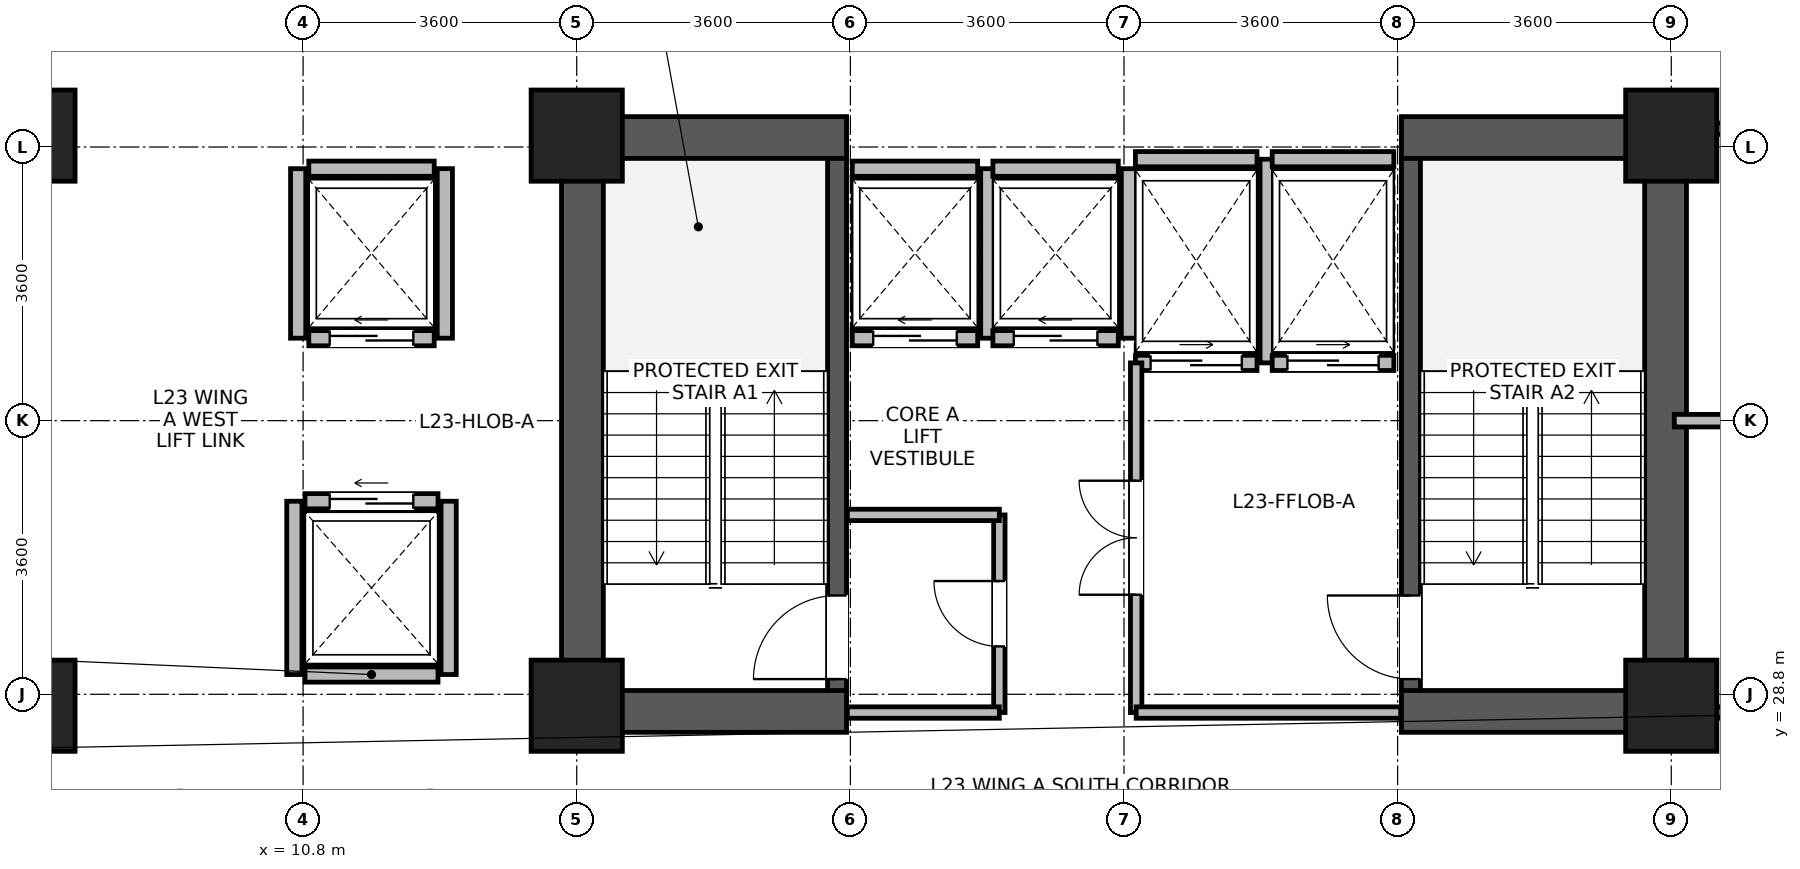
"""IFC4 building model, lengths in metres.
Left out: names, types, materials, properties, quantities, classifications, styles, units other than length and angle.
Written with IfcOpenShell. Run it as: python <this file> out.ifc"""

import sys

from ifc_helpers import new_model, si_unit, direction, frame, frame_2d, origin, origin_2d, place, context, subcontext, project, spatial, rectangle, extrude, source, transform, mapped, element, fill, save


model = new_model("IFC4")
c1 = context("Model", 3, precision=1e-05, world=origin(), true_north=direction((0.0, 1.0)))
c2 = subcontext(c1, "Body", "Model", "MODEL_VIEW")
j1 = project(units=[si_unit("LENGTHUNIT", "METRE"), si_unit("PLANEANGLEUNIT", "RADIAN")], contexts=[c1])
p1 = place(None, origin())
s1 = spatial("IfcSite", under=j1, at=p1, CompositionType="ELEMENT")
p2 = place(p1, origin())
s2 = spatial("IfcBuilding", under=s1, at=p2, CompositionType="ELEMENT")
p3 = place(p2, frame((0.0, 0.0, 93.4)))
s3 = spatial("IfcBuildingStorey", under=s2, at=p3, CompositionType="ELEMENT", Elevation=93.4)
for number, where, z_axis, x_axis in (
    (1, (14.475, 28.3, 0.0), (0.0, 0.0, 1.0), (0.0, 1.0, 0.0)),
    (2, (28.725, 28.3, 0.0), (0.0, 0.0, 1.0), (0.0, 1.0, 0.0)),
):
    element("IfcWall", number, at=place(p3, frame(where, z_axis=z_axis, x_axis=x_axis)), inside=s3, PredefinedType="SHEAR", context=c2, shape_type="SweptSolid", body=[
        extrude(rectangle(XDim=8.1, YDim=0.55, at=frame_2d((4.05, 0.0))), origin(), (0.0, 0.0, 1.0), 3.45),
    ])
for number, where, z_axis, x_axis in (
    (3, (14.75, 28.575, 0.0), (0.0, 0.0, 1.0), (1.0, 0.0, 0.0)),
    (4, (25.25, 28.575, 0.0), (0.0, 0.0, 1.0), (1.0, 0.0, 0.0)),
    (5, (14.75, 36.125, 0.0), (0.0, 0.0, 1.0), (1.0, 0.0, 0.0)),
    (6, (25.25, 36.125, 0.0), (0.0, 0.0, 1.0), (1.0, 0.0, 0.0)),
):
    element("IfcWall", number, at=place(p3, frame(where, z_axis=z_axis, x_axis=x_axis)), inside=s3, PredefinedType="SHEAR", context=c2, shape_type="SweptSolid", body=[
        extrude(rectangle(XDim=3.2, YDim=0.55, at=frame_2d((1.6, 0.0))), origin(), (0.0, 0.0, 1.0), 3.45),
    ])
p4 = place(p3, frame((17.825, 28.85, 0.0), z_axis=(0.0, 0.0, 1.0), x_axis=(0.0, 1.0, 0.0)))
e7 = element("IfcWall", 7, at=p4, inside=s3, PredefinedType="SHEAR", context=c2, shape_type="SweptSolid", body=[
    extrude(rectangle(XDim=7.0, YDim=0.25, at=frame_2d((3.5, 0.0))), origin(), (0.0, 0.0, 1.0), 3.45),
])
p5 = place(p4, frame((0.15, 0.0, 0.0)))
e8 = element("IfcOpeningElement", 8, at=p5, cuts=e7, PredefinedType="OPENING", context=c2, shape_type="SweptSolid", body=[
    extrude(rectangle(XDim=1.1, YDim=2.08, at=frame_2d((0.55, 1.04))), frame((0.0, 0.135, 0.0), z_axis=(0.0, -1.0, 0.0), x_axis=(1.0, 0.0, 0.0)), (0.0, 0.0, 1.0), 0.27),
])
p6 = place(p3, frame((25.375, 28.85, 0.0), z_axis=(0.0, 0.0, 1.0), x_axis=(0.0, 1.0, 0.0)))
e9 = element("IfcWall", 9, at=p6, inside=s3, PredefinedType="SHEAR", context=c2, shape_type="SweptSolid", body=[
    extrude(rectangle(XDim=7.0, YDim=0.25, at=frame_2d((3.5, 0.0))), origin(), (0.0, 0.0, 1.0), 3.45),
])
p7 = place(p6, frame((0.15, 0.0, 0.0)))
e10 = element("IfcOpeningElement", 10, at=p7, cuts=e9, PredefinedType="OPENING", context=c2, shape_type="SweptSolid", body=[
    extrude(rectangle(XDim=1.1, YDim=2.08, at=frame_2d((0.55, 1.04))), frame((0.0, 0.135, 0.0), z_axis=(0.0, -1.0, 0.0), x_axis=(1.0, 0.0, 0.0)), (0.0, 0.0, 1.0), 0.27),
])
m1 = source(origin(), c2, "Body", "SweptSolid", [
    extrude(rectangle(XDim=1.2, YDim=1.2, at=origin_2d()), origin(), (0.0, 0.0, 1.0), 3.7),
])
for number, where, z_axis, x_axis in (
    (11, (7.2, 28.65, 0.0), (0.0, 0.0, 1.0), (1.0, 0.0, 0.0)),
    (12, (7.2, 36.15, 0.0), (0.0, 0.0, 1.0), (1.0, 0.0, 0.0)),
    (13, (14.4, 28.65, 0.0), (0.0, 0.0, 1.0), (1.0, 0.0, 0.0)),
    (14, (14.4, 36.15, 0.0), (0.0, 0.0, 1.0), (1.0, 0.0, 0.0)),
    (15, (28.8, 28.65, 0.0), (0.0, 0.0, 1.0), (1.0, 0.0, 0.0)),
    (16, (28.8, 36.15, 0.0), (0.0, 0.0, 1.0), (1.0, 0.0, 0.0)),
):
    element("IfcColumn", number, at=place(p3, frame(where, z_axis=z_axis, x_axis=x_axis)), inside=s3, PredefinedType="COLUMN", context=c2, shape_type="MappedRepresentation", body=[
        mapped(m1, transform((0.0, 0.0, 0.0), x_axis=(1.0, 0.0, 0.0), y_axis=(0.0, 1.0, 0.0), z_axis=(0.0, 0.0, 1.0), scale=1.0)),
    ])
p8 = place(p3, frame((18.025, 33.485, 0.0), z_axis=(0.0, 0.0, 1.0), x_axis=(1.0, 0.0, 0.0)))
e17 = element("IfcWall", 17, at=p8, inside=s3, PredefinedType="PARTITIONING", context=c2, shape_type="SweptSolid", body=[
    extrude(rectangle(XDim=1.65, YDim=0.2, at=frame_2d((0.825, 0.0))), origin(), (0.0, 0.0, 1.0), 3.43),
])
p9 = place(p8, frame((0.275, 0.0, 0.0)))
e18 = element("IfcOpeningElement", 18, at=p9, cuts=e17, PredefinedType="OPENING", context=c2, shape_type="SweptSolid", body=[
    extrude(rectangle(XDim=1.1, YDim=2.12, at=frame_2d((0.55, 1.06))), frame((0.0, 0.11, 0.0), z_axis=(0.0, -1.0, 0.0), x_axis=(1.0, 0.0, 0.0)), (0.0, 0.0, 1.0), 0.22),
])
p10 = place(p3, frame((18.025, 35.715, 0.0), z_axis=(0.0, 0.0, 1.0), x_axis=(1.0, 0.0, 0.0)))
e19 = element("IfcWall", 19, at=p10, inside=s3, PredefinedType="PARTITIONING", context=c2, shape_type="SweptSolid", body=[
    extrude(rectangle(XDim=1.65, YDim=0.2, at=frame_2d((0.825, 0.0))), origin(), (0.0, 0.0, 1.0), 2.23),
])
p11 = place(p3, frame((19.815, 33.485, 0.0), z_axis=(0.0, 0.0, 1.0), x_axis=(0.0, 1.0, 0.0)))
e20 = element("IfcWall", 20, at=p11, inside=s3, PredefinedType="PARTITIONING", context=c2, shape_type="SweptSolid", body=[
    extrude(rectangle(XDim=2.23, YDim=0.2, at=frame_2d((1.115, 0.0))), origin(), (0.0, 0.0, 1.0), 3.43),
])
p12 = place(p3, frame((19.875, 33.485, 0.0), z_axis=(0.0, 0.0, 1.0), x_axis=(1.0, 0.0, 0.0)))
e21 = element("IfcWall", 21, at=p12, inside=s3, PredefinedType="PARTITIONING", context=c2, shape_type="SweptSolid", body=[
    extrude(rectangle(XDim=1.65, YDim=0.2, at=frame_2d((0.825, 0.0))), origin(), (0.0, 0.0, 1.0), 3.43),
])
p13 = place(p12, frame((0.275, 0.0, 0.0)))
e22 = element("IfcOpeningElement", 22, at=p13, cuts=e21, PredefinedType="OPENING", context=c2, shape_type="SweptSolid", body=[
    extrude(rectangle(XDim=1.1, YDim=2.12, at=frame_2d((0.55, 1.06))), frame((0.0, 0.11, 0.0), z_axis=(0.0, -1.0, 0.0), x_axis=(1.0, 0.0, 0.0)), (0.0, 0.0, 1.0), 0.22),
])
p14 = place(p3, frame((19.875, 35.715, 0.0), z_axis=(0.0, 0.0, 1.0), x_axis=(1.0, 0.0, 0.0)))
e23 = element("IfcWall", 23, at=p14, inside=s3, PredefinedType="PARTITIONING", context=c2, shape_type="SweptSolid", body=[
    extrude(rectangle(XDim=1.65, YDim=0.2, at=frame_2d((0.825, 0.0))), origin(), (0.0, 0.0, 1.0), 2.23),
])
p15 = place(p3, frame((21.665, 33.485, 0.0), z_axis=(0.0, 0.0, 1.0), x_axis=(0.0, 1.0, 0.0)))
e24 = element("IfcWall", 24, at=p15, inside=s3, PredefinedType="PARTITIONING", context=c2, shape_type="SweptSolid", body=[
    extrude(rectangle(XDim=2.23, YDim=0.2, at=frame_2d((1.115, 0.0))), origin(), (0.0, 0.0, 1.0), 3.43),
])
p16 = place(p3, frame((10.825, 29.06, 0.0), z_axis=(0.0, 0.0, 1.0), x_axis=(1.0, 0.0, 0.0)))
e25 = element("IfcWall", 25, at=p16, inside=s3, PredefinedType="PARTITIONING", context=c2, shape_type="SweptSolid", body=[
    extrude(rectangle(XDim=1.75, YDim=0.2, at=frame_2d((0.875, 0.0))), origin(), (0.0, 0.0, 1.0), 3.43),
])
p17 = place(p3, frame((10.825, 31.34, 0.0), z_axis=(0.0, 0.0, 1.0), x_axis=(1.0, 0.0, 0.0)))
e26 = element("IfcWall", 26, at=p17, inside=s3, PredefinedType="PARTITIONING", context=c2, shape_type="SweptSolid", body=[
    extrude(rectangle(XDim=1.75, YDim=0.2, at=frame_2d((0.875, 0.0))), origin(), (0.0, 0.0, 1.0), 3.43),
])
p18 = place(p17, frame((0.325, 0.0, 0.0)))
e27 = element("IfcOpeningElement", 27, at=p18, cuts=e26, PredefinedType="OPENING", context=c2, shape_type="SweptSolid", body=[
    extrude(rectangle(XDim=1.1, YDim=2.12, at=frame_2d((0.55, 1.06))), frame((0.0, 0.11, 0.0), z_axis=(0.0, -1.0, 0.0), x_axis=(1.0, 0.0, 0.0)), (0.0, 0.0, 1.0), 0.22),
])
for number, where, z_axis, x_axis in (
    (28, (10.685, 29.06, 0.0), (0.0, 0.0, 1.0), (0.0, 1.0, 0.0)),
    (29, (12.715, 29.06, 0.0), (0.0, 0.0, 1.0), (0.0, 1.0, 0.0)),
):
    element("IfcWall", number, at=place(p3, frame(where, z_axis=z_axis, x_axis=x_axis)), inside=s3, PredefinedType="PARTITIONING", context=c2, shape_type="SweptSolid", body=[
        extrude(rectangle(XDim=2.28, YDim=0.2, at=frame_2d((1.14, 0.0))), origin(), (0.0, 0.0, 1.0), 3.43),
    ])
p19 = place(p3, frame((10.875, 33.485, 0.0), z_axis=(0.0, 0.0, 1.0), x_axis=(1.0, 0.0, 0.0)))
e30 = element("IfcWall", 30, at=p19, inside=s3, PredefinedType="PARTITIONING", context=c2, shape_type="SweptSolid", body=[
    extrude(rectangle(XDim=1.65, YDim=0.2, at=frame_2d((0.825, 0.0))), origin(), (0.0, 0.0, 1.0), 3.43),
])
p20 = place(p19, frame((0.275, 0.0, 0.0)))
e31 = element("IfcOpeningElement", 31, at=p20, cuts=e30, PredefinedType="OPENING", context=c2, shape_type="SweptSolid", body=[
    extrude(rectangle(XDim=1.1, YDim=2.12, at=frame_2d((0.55, 1.06))), frame((0.0, 0.11, 0.0), z_axis=(0.0, -1.0, 0.0), x_axis=(1.0, 0.0, 0.0)), (0.0, 0.0, 1.0), 0.22),
])
p21 = place(p3, frame((10.875, 35.715, 0.0), z_axis=(0.0, 0.0, 1.0), x_axis=(1.0, 0.0, 0.0)))
e32 = element("IfcWall", 32, at=p21, inside=s3, PredefinedType="PARTITIONING", context=c2, shape_type="SweptSolid", body=[
    extrude(rectangle(XDim=1.65, YDim=0.2, at=frame_2d((0.825, 0.0))), origin(), (0.0, 0.0, 1.0), 3.43),
])
for number, where, z_axis, x_axis in (
    (33, (10.735, 33.485, 0.0), (0.0, 0.0, 1.0), (0.0, 1.0, 0.0)),
    (34, (12.665, 33.485, 0.0), (0.0, 0.0, 1.0), (0.0, 1.0, 0.0)),
):
    element("IfcWall", number, at=place(p3, frame(where, z_axis=z_axis, x_axis=x_axis)), inside=s3, PredefinedType="PARTITIONING", context=c2, shape_type="SweptSolid", body=[
        extrude(rectangle(XDim=2.23, YDim=0.2, at=frame_2d((1.115, 0.0))), origin(), (0.0, 0.0, 1.0), 3.43),
    ])
p22 = place(p3, frame((21.75, 33.16, 0.0), z_axis=(0.0, 0.0, 1.0), x_axis=(1.0, 0.0, 0.0)))
e35 = element("IfcWall", 35, at=p22, inside=s3, PredefinedType="PARTITIONING", context=c2, shape_type="SweptSolid", body=[
    extrude(rectangle(XDim=1.6, YDim=0.2, at=frame_2d((0.8, 0.0))), origin(), (0.0, 0.0, 1.0), 3.43),
])
p23 = place(p22, frame((0.2, 0.0, 0.0)))
e36 = element("IfcOpeningElement", 36, at=p23, cuts=e35, PredefinedType="OPENING", context=c2, shape_type="SweptSolid", body=[
    extrude(rectangle(XDim=1.2, YDim=2.12, at=frame_2d((0.6, 1.06))), frame((0.0, 0.11, 0.0), z_axis=(0.0, -1.0, 0.0), x_axis=(1.0, 0.0, 0.0)), (0.0, 0.0, 1.0), 0.22),
])
p24 = place(p3, frame((21.75, 35.84, 0.0), z_axis=(0.0, 0.0, 1.0), x_axis=(1.0, 0.0, 0.0)))
e37 = element("IfcWall", 37, at=p24, inside=s3, PredefinedType="PARTITIONING", context=c2, shape_type="SweptSolid", body=[
    extrude(rectangle(XDim=1.6, YDim=0.2, at=frame_2d((0.8, 0.0))), origin(), (0.0, 0.0, 1.0), 2.23),
])
p25 = place(p3, frame((23.49, 33.16, 0.0), z_axis=(0.0, 0.0, 1.0), x_axis=(0.0, 1.0, 0.0)))
e38 = element("IfcWall", 38, at=p25, inside=s3, PredefinedType="PARTITIONING", context=c2, shape_type="SweptSolid", body=[
    extrude(rectangle(XDim=2.68, YDim=0.2, at=frame_2d((1.34, 0.0))), origin(), (0.0, 0.0, 1.0), 3.43),
])
p26 = place(p3, frame((23.55, 33.16, 0.0), z_axis=(0.0, 0.0, 1.0), x_axis=(1.0, 0.0, 0.0)))
e39 = element("IfcWall", 39, at=p26, inside=s3, PredefinedType="PARTITIONING", context=c2, shape_type="SweptSolid", body=[
    extrude(rectangle(XDim=1.6, YDim=0.2, at=frame_2d((0.8, 0.0))), origin(), (0.0, 0.0, 1.0), 3.43),
])
p27 = place(p26, frame((0.2, 0.0, 0.0)))
e40 = element("IfcOpeningElement", 40, at=p27, cuts=e39, PredefinedType="OPENING", context=c2, shape_type="SweptSolid", body=[
    extrude(rectangle(XDim=1.2, YDim=2.12, at=frame_2d((0.6, 1.06))), frame((0.0, 0.11, 0.0), z_axis=(0.0, -1.0, 0.0), x_axis=(1.0, 0.0, 0.0)), (0.0, 0.0, 1.0), 0.22),
])
p28 = place(p3, frame((23.55, 35.84, 0.0), z_axis=(0.0, 0.0, 1.0), x_axis=(1.0, 0.0, 0.0)))
e41 = element("IfcWall", 41, at=p28, inside=s3, PredefinedType="PARTITIONING", context=c2, shape_type="SweptSolid", body=[
    extrude(rectangle(XDim=1.6, YDim=0.2, at=frame_2d((0.8, 0.0))), origin(), (0.0, 0.0, 1.0), 2.23),
])
p29 = place(p3, frame((29.4, 28.56, 0.0), z_axis=(0.0, 0.0, 1.0), x_axis=(1.0, 0.0, 0.0)))
e42 = element("IfcWall", 42, at=p29, inside=s3, PredefinedType="PARTITIONING", context=c2, shape_type="SweptSolid", body=[
    extrude(rectangle(XDim=3.96, YDim=0.15, at=frame_2d((1.98, 0.0))), origin(), (0.0, 0.0, 1.0), 2.78),
])
p30 = place(p29, frame((1.55, 0.0, 0.0)))
e43 = element("IfcOpeningElement", 43, at=p30, cuts=e42, PredefinedType="OPENING", context=c2, shape_type="SweptSolid", body=[
    extrude(rectangle(XDim=0.86, YDim=2.02, at=frame_2d((0.43, 1.01))), frame((0.0, 0.085, 0.0), z_axis=(0.0, -1.0, 0.0), x_axis=(1.0, 0.0, 0.0)), (0.0, 0.0, 1.0), 0.17),
])
p31 = place(p3, frame((29.4, 36.24, 0.0), z_axis=(0.0, 0.0, 1.0), x_axis=(1.0, 0.0, 0.0)))
e44 = element("IfcWall", 44, at=p31, inside=s3, PredefinedType="PARTITIONING", context=c2, shape_type="SweptSolid", body=[
    extrude(rectangle(XDim=3.96, YDim=0.15, at=frame_2d((1.98, 0.0))), origin(), (0.0, 0.0, 1.0), 2.78),
])
p32 = place(p31, frame((1.33, 0.0, 0.0)))
e45 = element("IfcOpeningElement", 45, at=p32, cuts=e44, PredefinedType="OPENING", context=c2, shape_type="SweptSolid", body=[
    extrude(rectangle(XDim=1.3, YDim=2.12, at=frame_2d((0.65, 1.06))), frame((0.0, 0.085, 0.0), z_axis=(0.0, -1.0, 0.0), x_axis=(1.0, 0.0, 0.0)), (0.0, 0.0, 1.0), 0.17),
])
p33 = place(p3, frame((19.96, 28.56, 0.0), z_axis=(0.0, 0.0, 1.0), x_axis=(0.0, 1.0, 0.0)))
e46 = element("IfcWall", 46, at=p33, inside=s3, PredefinedType="PARTITIONING", context=c2, shape_type="SweptSolid", body=[
    extrude(rectangle(XDim=2.6, YDim=0.15, at=frame_2d((1.3, 0.0))), origin(), (0.0, 0.0, 1.0), 3.43),
])
p34 = place(p33, frame((0.87, 0.0, 0.0)))
e47 = element("IfcOpeningElement", 47, at=p34, cuts=e46, PredefinedType="OPENING", context=c2, shape_type="SweptSolid", body=[
    extrude(rectangle(XDim=0.86, YDim=2.02, at=frame_2d((0.43, 1.01))), frame((0.0, 0.085, 0.0), z_axis=(0.0, -1.0, 0.0), x_axis=(1.0, 0.0, 0.0)), (0.0, 0.0, 1.0), 0.17),
])
p35 = place(p3, frame((17.96, 28.56, 0.0), z_axis=(0.0, 0.0, 1.0), x_axis=(1.0, 0.0, 0.0)))
e48 = element("IfcWall", 48, at=p35, inside=s3, PredefinedType="PARTITIONING", context=c2, shape_type="SweptSolid", body=[
    extrude(rectangle(XDim=2.0, YDim=0.15, at=frame_2d((1.0, 0.0))), origin(), (0.0, 0.0, 1.0), 2.23),
])
p36 = place(p3, frame((17.96, 31.16, 0.0), z_axis=(0.0, 0.0, 1.0), x_axis=(1.0, 0.0, 0.0)))
e49 = element("IfcWall", 49, at=p36, inside=s3, PredefinedType="PARTITIONING", context=c2, shape_type="SweptSolid", body=[
    extrude(rectangle(XDim=2.0, YDim=0.15, at=frame_2d((1.0, 0.0))), origin(), (0.0, 0.0, 1.0), 3.43),
])
p37 = place(p3, frame((21.76, 28.56, 0.0), z_axis=(0.0, 0.0, 1.0), x_axis=(0.0, 1.0, 0.0)))
e50 = element("IfcWall", 50, at=p37, inside=s3, PredefinedType="PARTITIONING", context=c2, shape_type="SweptSolid", body=[
    extrude(rectangle(XDim=4.6, YDim=0.15, at=frame_2d((2.3, 0.0))), origin(), (0.0, 0.0, 1.0), 3.43),
])
p38 = place(p37, frame((1.55, 0.0, 0.0)))
e51 = element("IfcOpeningElement", 51, at=p38, cuts=e50, PredefinedType="OPENING", context=c2, shape_type="SweptSolid", body=[
    extrude(rectangle(XDim=1.5, YDim=2.1, at=frame_2d((0.75, 1.05))), frame((0.0, 0.085, 0.0), z_axis=(0.0, -1.0, 0.0), x_axis=(1.0, 0.0, 0.0)), (0.0, 0.0, 1.0), 0.17),
])
p39 = place(p3, frame((28.84, 32.4, 0.0), z_axis=(0.0, 0.0, 1.0), x_axis=(1.0, 0.0, 0.0)))
e52 = element("IfcWall", 52, at=p39, inside=s3, PredefinedType="PARTITIONING", context=c2, shape_type="SweptSolid", body=[
    extrude(rectangle(XDim=4.52, YDim=0.165, at=frame_2d((2.26, 0.0))), origin(), (0.0, 0.0, 1.0), 3.43),
])
p40 = place(p3, frame((21.76, 28.56, 0.0), z_axis=(0.0, 0.0, 1.0), x_axis=(1.0, 0.0, 0.0)))
e53 = element("IfcWall", 53, at=p40, inside=s3, PredefinedType="PARTITIONING", context=c2, shape_type="SweptSolid", body=[
    extrude(rectangle(XDim=3.48, YDim=0.15, at=frame_2d((1.74, 0.0))), origin(), (0.0, 0.0, 1.0), 2.23),
])
p41 = place(p5, origin())
e54 = element("IfcDoor", 54, at=p41, inside=s3, OperationType="SINGLE_SWING_LEFT", PredefinedType="DOOR", context=c2, shape_type="SweptSolid", body=[
    extrude(rectangle(XDim=1.1, YDim=2.08, at=frame_2d((0.55, 1.04))), frame((0.0, 0.025, 0.0), z_axis=(0.0, -1.0, 0.0), x_axis=(1.0, 0.0, 0.0)), (0.0, 0.0, 1.0), 0.05),
])
fill(e8, e54)
p42 = place(p7, origin())
e55 = element("IfcDoor", 55, at=p42, inside=s3, OperationType="SINGLE_SWING_RIGHT", PredefinedType="DOOR", context=c2, shape_type="SweptSolid", body=[
    extrude(rectangle(XDim=1.1, YDim=2.08, at=frame_2d((0.55, 1.04))), frame((0.0, 0.025, 0.0), z_axis=(0.0, -1.0, 0.0), x_axis=(1.0, 0.0, 0.0)), (0.0, 0.0, 1.0), 0.05),
])
fill(e10, e55)
p43 = place(p9, origin())
e56 = element("IfcDoor", 56, at=p43, inside=s3, OperationType="SLIDING_TO_LEFT", PredefinedType="DOOR", context=c2, shape_type="SweptSolid", body=[
    extrude(rectangle(XDim=1.1, YDim=2.12, at=frame_2d((0.55, 1.06))), frame((0.0, 0.025, 0.0), z_axis=(0.0, -1.0, 0.0), x_axis=(1.0, 0.0, 0.0)), (0.0, 0.0, 1.0), 0.05),
])
fill(e18, e56)
p44 = place(p13, origin())
e57 = element("IfcDoor", 57, at=p44, inside=s3, OperationType="SLIDING_TO_LEFT", PredefinedType="DOOR", context=c2, shape_type="SweptSolid", body=[
    extrude(rectangle(XDim=1.1, YDim=2.12, at=frame_2d((0.55, 1.06))), frame((0.0, 0.025, 0.0), z_axis=(0.0, -1.0, 0.0), x_axis=(1.0, 0.0, 0.0)), (0.0, 0.0, 1.0), 0.05),
])
fill(e22, e57)
p45 = place(p18, origin())
e58 = element("IfcDoor", 58, at=p45, inside=s3, OperationType="SLIDING_TO_LEFT", PredefinedType="DOOR", context=c2, shape_type="SweptSolid", body=[
    extrude(rectangle(XDim=1.1, YDim=2.12, at=frame_2d((0.55, 1.06))), frame((0.0, 0.025, 0.0), z_axis=(0.0, -1.0, 0.0), x_axis=(1.0, 0.0, 0.0)), (0.0, 0.0, 1.0), 0.05),
])
fill(e27, e58)
p46 = place(p20, origin())
e59 = element("IfcDoor", 59, at=p46, inside=s3, OperationType="SLIDING_TO_LEFT", PredefinedType="DOOR", context=c2, shape_type="SweptSolid", body=[
    extrude(rectangle(XDim=1.1, YDim=2.12, at=frame_2d((0.55, 1.06))), frame((0.0, 0.025, 0.0), z_axis=(0.0, -1.0, 0.0), x_axis=(1.0, 0.0, 0.0)), (0.0, 0.0, 1.0), 0.05),
])
fill(e31, e59)
p47 = place(p23, origin())
e60 = element("IfcDoor", 60, at=p47, inside=s3, OperationType="SLIDING_TO_RIGHT", PredefinedType="DOOR", context=c2, shape_type="SweptSolid", body=[
    extrude(rectangle(XDim=1.2, YDim=2.12, at=frame_2d((0.6, 1.06))), frame((0.0, 0.025, 0.0), z_axis=(0.0, -1.0, 0.0), x_axis=(1.0, 0.0, 0.0)), (0.0, 0.0, 1.0), 0.05),
])
fill(e36, e60)
p48 = place(p27, origin())
e61 = element("IfcDoor", 61, at=p48, inside=s3, OperationType="SLIDING_TO_RIGHT", PredefinedType="DOOR", context=c2, shape_type="SweptSolid", body=[
    extrude(rectangle(XDim=1.2, YDim=2.12, at=frame_2d((0.6, 1.06))), frame((0.0, 0.025, 0.0), z_axis=(0.0, -1.0, 0.0), x_axis=(1.0, 0.0, 0.0)), (0.0, 0.0, 1.0), 0.05),
])
fill(e40, e61)
p49 = place(p34, origin())
e62 = element("IfcDoor", 62, at=p49, inside=s3, OperationType="SINGLE_SWING_RIGHT", PredefinedType="DOOR", context=c2, shape_type="SweptSolid", body=[
    extrude(rectangle(XDim=0.86, YDim=2.02, at=frame_2d((0.43, 1.01))), frame((0.0, 0.025, 0.0), z_axis=(0.0, -1.0, 0.0), x_axis=(1.0, 0.0, 0.0)), (0.0, 0.0, 1.0), 0.05),
])
fill(e47, e62)
p50 = place(p38, origin())
e63 = element("IfcDoor", 63, at=p50, inside=s3, OperationType="DOUBLE_DOOR_SINGLE_SWING", PredefinedType="DOOR", context=c2, shape_type="SweptSolid", body=[
    extrude(rectangle(XDim=1.5, YDim=2.1, at=frame_2d((0.75, 1.05))), frame((0.0, 0.025, 0.0), z_axis=(0.0, -1.0, 0.0), x_axis=(1.0, 0.0, 0.0)), (0.0, 0.0, 1.0), 0.05),
])
fill(e51, e63)
save(model, sys.argv[1])
